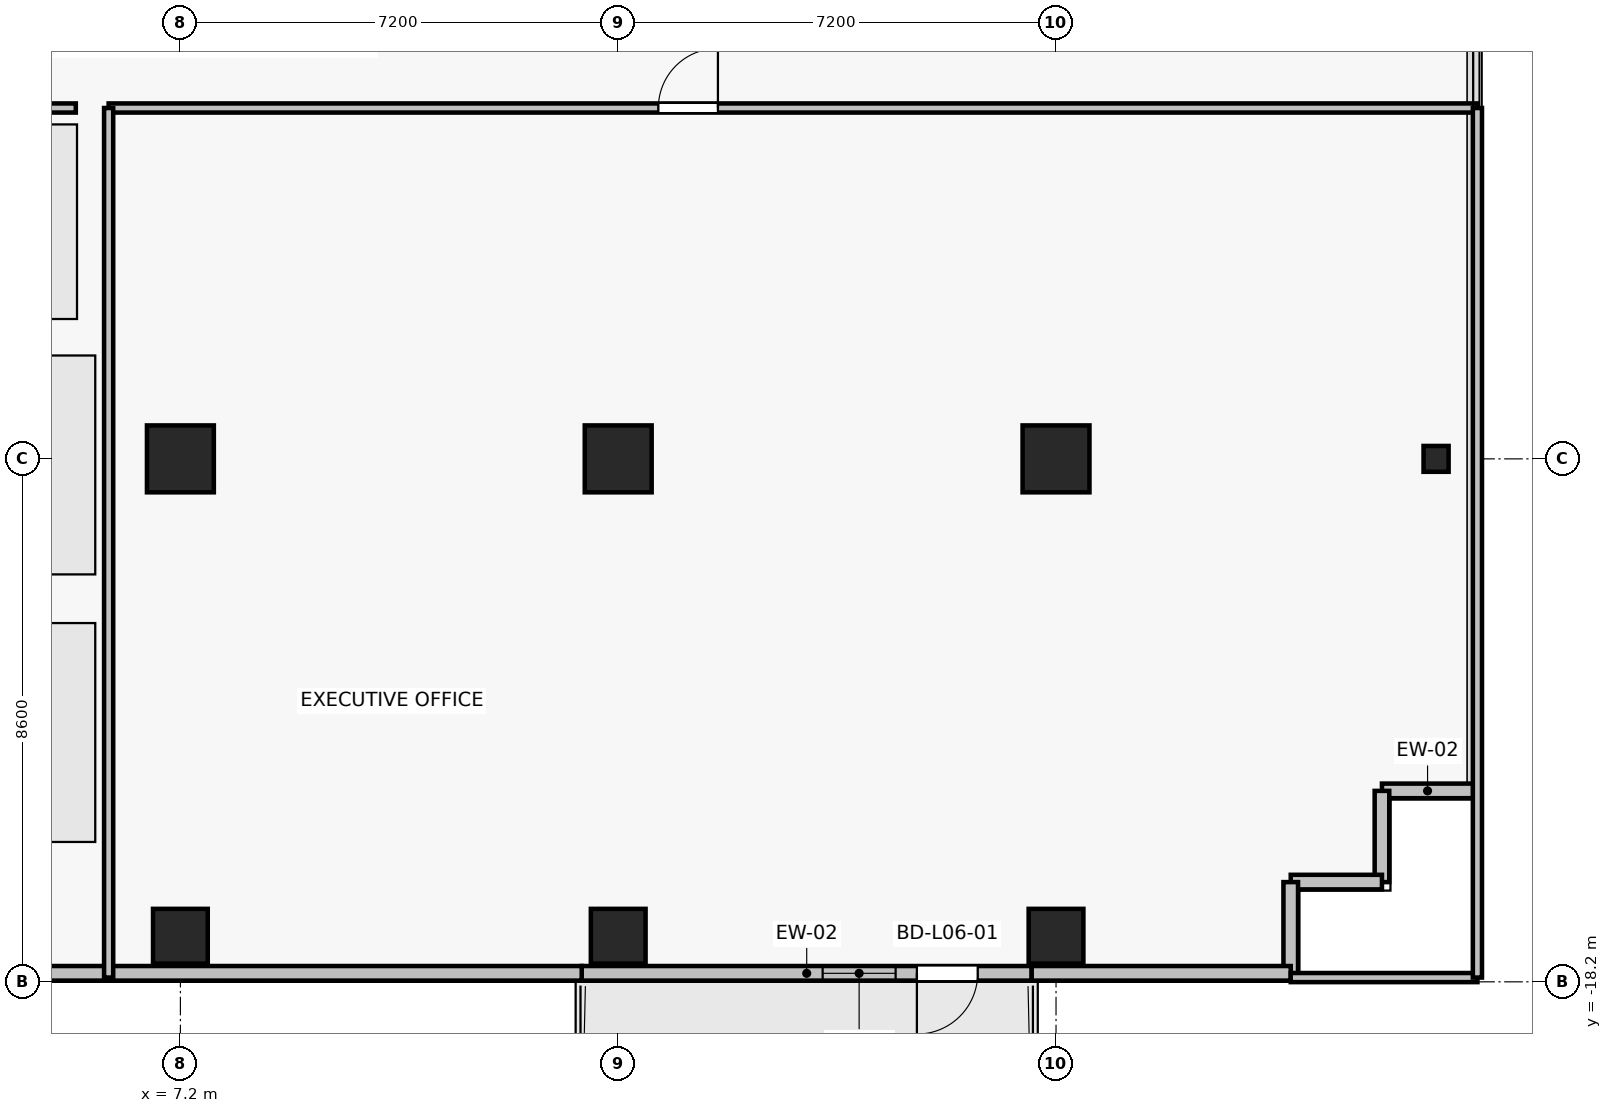
"""IFC4 building model, lengths in metres.
Left out: names, types, materials, properties, quantities, classifications, styles, units other than length and angle.
Written with IfcOpenShell. Run it as: python <this file> out.ifc"""

import sys

from ifc_helpers import new_model, si_unit, direction, frame, frame_2d, origin, origin_2d, place, context, subcontext, project, spatial, rectangle, i_section, extrude, source, transform, mapped, element, fill, save


model = new_model("IFC4")
c1 = context("Model", 3, precision=1e-05, world=origin(), true_north=direction((0.0, 1.0)))
c2 = subcontext(c1, "Body", "Model", "MODEL_VIEW")
j1 = project(units=[si_unit("LENGTHUNIT", "METRE"), si_unit("PLANEANGLEUNIT", "RADIAN")], contexts=[c1])
p1 = place(None, origin())
s1 = spatial("IfcSite", under=j1, at=p1, CompositionType="ELEMENT")
p2 = place(p1, origin())
s2 = spatial("IfcBuilding", under=s1, at=p2, CompositionType="ELEMENT")
p3 = place(p2, frame((0.0, 0.0, 27.4)))
s3 = spatial("IfcBuildingStorey", under=s2, at=p3, CompositionType="ELEMENT", Elevation=27.4)
for number, where, z_axis, x_axis in (
    (1, (7.2, -9.6, 0.0), (0.0, 0.0, 1.0), (1.0, 0.0, 0.0)),
    (2, (14.4, -9.6, 0.0), (0.0, 0.0, 1.0), (1.0, 0.0, 0.0)),
    (3, (21.6, -9.6, 0.0), (0.0, 0.0, 1.0), (1.0, 0.0, 0.0)),
):
    element("IfcColumn", number, at=place(p3, frame(where, z_axis=z_axis, x_axis=x_axis)), inside=s3, PredefinedType="COLUMN", context=c2, shape_type="SweptSolid", body=[
        extrude(rectangle(XDim=1.1, YDim=1.1, at=origin_2d()), origin(), (0.0, 0.0, 1.0), 3.3),
    ])
for number, where, z_axis, x_axis in (
    (4, (7.2, -17.45, 0.0), (0.0, 0.0, 1.0), (1.0, 0.0, 0.0)),
    (5, (14.4, -17.45, 0.0), (0.0, 0.0, 1.0), (1.0, 0.0, 0.0)),
    (6, (21.6, -17.45, 0.0), (0.0, 0.0, 1.0), (1.0, 0.0, 0.0)),
):
    element("IfcColumn", number, at=place(p3, frame(where, z_axis=z_axis, x_axis=x_axis)), inside=s3, PredefinedType="COLUMN", context=c2, shape_type="SweptSolid", body=[
        extrude(rectangle(XDim=0.9, YDim=0.9, at=origin_2d()), origin(), (0.0, 0.0, 1.0), 3.3),
    ])
p4 = place(p3, frame((27.85, -9.6, 0.0), z_axis=(0.0, 0.0, 1.0), x_axis=(1.0, 0.0, 0.0)))
e7 = element("IfcColumn", 7, at=p4, inside=s3, PredefinedType="COLUMN", context=c2, shape_type="SweptSolid", body=[
    extrude(i_section(OverallWidth=0.412, OverallDepth=0.425, WebThickness=0.026, FlangeThickness=0.039, FilletRadius=0.015, at=origin_2d()), origin(), (0.0, 0.0, 1.0), 3.3),
])
p5 = place(p3, frame((21.2, -18.06, 0.0), z_axis=(0.0, 0.0, 1.0), x_axis=(-1.0, 0.0, 0.0)))
e8 = element("IfcWall", 8, at=p5, inside=s3, PredefinedType="SOLIDWALL", context=c2, shape_type="SweptSolid", body=[
    extrude(rectangle(XDim=7.4, YDim=0.24, at=frame_2d((3.7, 0.0))), origin(), (0.0, 0.0, 1.0), 2.665),
])
p6 = place(p5, frame((0.888, 0.0, 0.0)))
e9 = element("IfcOpeningElement", 9, at=p6, cuts=e8, PredefinedType="OPENING", context=c2, shape_type="SweptSolid", body=[
    extrude(rectangle(XDim=1.0, YDim=2.2, at=frame_2d((0.5, 1.1))), frame((0.0, 0.13, 0.0), z_axis=(0.0, -1.0, 0.0), x_axis=(1.0, 0.0, 0.0)), (0.0, 0.0, 1.0), 0.26),
])
p7 = place(p5, frame((2.238, 0.0, 0.85)))
e10 = element("IfcOpeningElement", 10, at=p7, cuts=e8, PredefinedType="OPENING", context=c2, shape_type="SweptSolid", body=[
    extrude(rectangle(XDim=1.2, YDim=1.5, at=frame_2d((0.6, 0.75))), frame((0.0, 0.13, 0.0), z_axis=(0.0, -1.0, 0.0), x_axis=(1.0, 0.0, 0.0)), (0.0, 0.0, 1.0), 0.26),
])
for number, where, z_axis, x_axis in (
    (11, (26.96, -15.06, 0.0), (0.0, 0.0, 1.0), (1.0, 0.0, 0.0)),
    (12, (26.96, -16.56, 0.0), (0.0, 0.0, 1.0), (0.0, 1.0, 0.0)),
    (13, (25.46, -16.56, 0.0), (0.0, 0.0, 1.0), (1.0, 0.0, 0.0)),
    (14, (25.46, -18.06, 0.0), (0.0, 0.0, 1.0), (0.0, 1.0, 0.0)),
):
    element("IfcWall", number, at=place(p3, frame(where, z_axis=z_axis, x_axis=x_axis)), inside=s3, PredefinedType="SOLIDWALL", context=c2, shape_type="SweptSolid", body=[
        extrude(rectangle(XDim=1.5, YDim=0.24, at=frame_2d((0.75, 0.0))), origin(), (0.0, 0.0, 1.0), 3.075),
    ])
p8 = place(p3, frame((21.2, -18.06, 0.0), z_axis=(0.0, 0.0, 1.0), x_axis=(1.0, 0.0, 0.0)))
e15 = element("IfcWall", 15, at=p8, inside=s3, PredefinedType="SOLIDWALL", context=c2, shape_type="SweptSolid", body=[
    extrude(rectangle(XDim=4.26, YDim=0.24, at=frame_2d((2.13, 0.0))), origin(), (0.0, 0.0, 1.0), 3.075),
])
p9 = place(p3, frame((3.34, -18.06, 0.0), z_axis=(0.0, 0.0, 1.0), x_axis=(1.0, 0.0, 0.0)))
e16 = element("IfcWall", 16, at=p9, inside=s3, PredefinedType="SOLIDWALL", context=c2, shape_type="SweptSolid", body=[
    extrude(rectangle(XDim=10.46, YDim=0.24, at=frame_2d((5.23, 0.0))), origin(), (0.0, 0.0, 1.0), 2.665),
])
p10 = place(p3, frame((28.53, -18.13, 0.0), z_axis=(0.0, 0.0, 1.0), x_axis=(-1.0, 0.0, 0.0)))
e17 = element("IfcWall", 17, at=p10, inside=s3, PredefinedType="PARTITIONING", context=c2, shape_type="SweptSolid", body=[
    extrude(rectangle(XDim=3.07, YDim=0.15, at=frame_2d((1.535, 0.0))), origin(), (0.0, 0.0, 1.0), 2.665),
])
p11 = place(p3, frame((6.02, -3.83, 0.0), z_axis=(0.0, 0.0, 1.0), x_axis=(1.0, 0.0, 0.0)))
e18 = element("IfcWall", 18, at=p11, inside=s3, PredefinedType="PARTITIONING", context=c2, shape_type="SweptSolid", body=[
    extrude(rectangle(XDim=22.51, YDim=0.15, at=frame_2d((11.255, 0.0))), origin(), (0.0, 0.0, 1.0), 2.465),
])
p12 = place(p11, frame((9.04, 0.0, 0.0)))
e19 = element("IfcOpeningElement", 19, at=p12, cuts=e18, PredefinedType="OPENING", context=c2, shape_type="SweptSolid", body=[
    extrude(rectangle(XDim=0.98, YDim=2.15, at=frame_2d((0.49, 1.075))), frame((0.0, 0.085, 0.0), z_axis=(0.0, -1.0, 0.0), x_axis=(1.0, 0.0, 0.0)), (0.0, 0.0, 1.0), 0.17),
])
p13 = place(p3, frame((6.02, -18.13, 0.0), z_axis=(0.0, 0.0, 1.0), x_axis=(0.0, 1.0, 0.0)))
e20 = element("IfcWall", 20, at=p13, inside=s3, PredefinedType="PARTITIONING", context=c2, shape_type="SweptSolid", body=[
    extrude(rectangle(XDim=14.3, YDim=0.15, at=frame_2d((7.15, 0.0))), origin(), (0.0, 0.0, 1.0), 2.465),
])
p14 = place(p3, frame((28.53, -3.83, 0.0), z_axis=(0.0, 0.0, 1.0), x_axis=(0.0, -1.0, 0.0)))
e21 = element("IfcWall", 21, at=p14, inside=s3, PredefinedType="PARTITIONING", context=c2, shape_type="SweptSolid", body=[
    extrude(rectangle(XDim=14.3, YDim=0.15, at=frame_2d((7.15, 0.0))), origin(), (0.0, 0.0, 1.0), 2.665),
])
p15 = place(p3, frame((5.48, -14.3, 0.0), z_axis=(0.0, 0.0, 1.0), x_axis=(-1.0, 0.0, 0.0)))
e22 = element("IfcWall", 22, at=p15, inside=s3, PredefinedType="PARTITIONING", context=c2, shape_type="SweptSolid", body=[
    extrude(rectangle(XDim=10.96, YDim=0.15, at=frame_2d((5.48, 0.0))), origin(), (0.0, 0.0, 1.0), 2.465),
])
p16 = place(p3, frame((-5.48, -3.83, 0.0), z_axis=(0.0, 0.0, 1.0), x_axis=(1.0, 0.0, 0.0)))
e23 = element("IfcWall", 23, at=p16, inside=s3, PredefinedType="PARTITIONING", context=c2, shape_type="SweptSolid", body=[
    extrude(rectangle(XDim=10.96, YDim=0.15, at=frame_2d((5.48, 0.0))), origin(), (0.0, 0.0, 1.0), 3.075),
])
p17 = place(p16, frame((4.99, 0.0, 0.0)))
e24 = element("IfcOpeningElement", 24, at=p17, cuts=e23, PredefinedType="OPENING", context=c2, shape_type="SweptSolid", body=[
    extrude(rectangle(XDim=0.98, YDim=2.15, at=frame_2d((0.49, 1.075))), frame((0.0, 0.085, 0.0), z_axis=(0.0, -1.0, 0.0), x_axis=(1.0, 0.0, 0.0)), (0.0, 0.0, 1.0), 0.17),
])
p18 = place(p3, frame((0.0, 0.0, -0.25)))
p19 = place(p18, frame((4.2, -14.1, 0.0)))
p20 = place(p19, frame((0.0, 0.0, 0.2)))
e25 = element("IfcWindow", 25, at=p20, inside=s3, PartitioningType="SINGLE_PANEL", PredefinedType="SKYLIGHT", context=c2, shape_type="SweptSolid", body=[
    extrude(rectangle(XDim=3.2, YDim=3.6, at=origin_2d()), origin(), (0.0, 0.0, 1.0), 0.05),
])
p21 = place(p18, frame((4.2, -9.7, 0.0)))
p22 = place(p21, frame((0.0, 0.0, 0.2)))
e26 = element("IfcWindow", 26, at=p22, inside=s3, PartitioningType="SINGLE_PANEL", PredefinedType="SKYLIGHT", context=c2, shape_type="SweptSolid", body=[
    extrude(rectangle(XDim=3.2, YDim=3.6, at=origin_2d()), origin(), (0.0, 0.0, 1.0), 0.05),
])
p23 = place(p18, frame((4.2, -5.7, 0.0)))
p24 = place(p23, frame((0.0, 0.0, 0.2)))
e27 = element("IfcWindow", 27, at=p24, inside=s3, PartitioningType="SINGLE_PANEL", PredefinedType="SKYLIGHT", context=c2, shape_type="SweptSolid", body=[
    extrude(rectangle(XDim=2.6, YDim=3.2, at=origin_2d()), origin(), (0.0, 0.0, 1.0), 0.05),
])
m1 = source(origin(), c2, "Body", "SweptSolid", [
    extrude(rectangle(XDim=1.0, YDim=2.2, at=frame_2d((0.5, 1.1))), frame((0.0, 0.025, 0.0), z_axis=(0.0, -1.0, 0.0), x_axis=(1.0, 0.0, 0.0)), (0.0, 0.0, 1.0), 0.05),
])
p25 = place(p6, origin())
e28 = element("IfcDoor", 28, at=p25, inside=s3, OperationType="SINGLE_SWING_RIGHT", PredefinedType="DOOR", context=c2, shape_type="MappedRepresentation", body=[
    mapped(m1, transform((0.0, 0.0, 0.0), x_axis=(1.0, 0.0, 0.0), y_axis=(0.0, 1.0, 0.0), z_axis=(0.0, 0.0, 1.0), scale=1.0)),
])
fill(e9, e28)
m2 = source(origin(), c2, "Body", "SweptSolid", [
    extrude(rectangle(XDim=1.2, YDim=1.5, at=frame_2d((0.6, 0.75))), frame((0.0, 0.03, 0.0), z_axis=(0.0, -1.0, 0.0), x_axis=(1.0, 0.0, 0.0)), (0.0, 0.0, 1.0), 0.06),
])
p26 = place(p7, origin())
e29 = element("IfcWindow", 29, at=p26, inside=s3, PartitioningType="SINGLE_PANEL", PredefinedType="WINDOW", context=c2, shape_type="MappedRepresentation", body=[
    mapped(m2, transform((0.0, 0.0, 0.0), x_axis=(1.0, 0.0, 0.0), y_axis=(0.0, 1.0, 0.0), z_axis=(0.0, 0.0, 1.0), scale=1.0)),
])
fill(e10, e29)
m3 = source(origin(), c2, "Body", "SweptSolid", [
    extrude(rectangle(XDim=0.98, YDim=2.15, at=frame_2d((0.49, 1.075))), frame((0.0, 0.025, 0.0), z_axis=(0.0, -1.0, 0.0), x_axis=(1.0, 0.0, 0.0)), (0.0, 0.0, 1.0), 0.05),
])
p27 = place(p12, origin())
e30 = element("IfcDoor", 30, at=p27, inside=s3, OperationType="SINGLE_SWING_RIGHT", PredefinedType="DOOR", context=c2, shape_type="MappedRepresentation", body=[
    mapped(m3, transform((0.0, 0.0, 0.0), x_axis=(1.0, 0.0, 0.0), y_axis=(0.0, 1.0, 0.0), z_axis=(0.0, 0.0, 1.0), scale=1.0)),
])
fill(e19, e30)
save(model, sys.argv[1])
